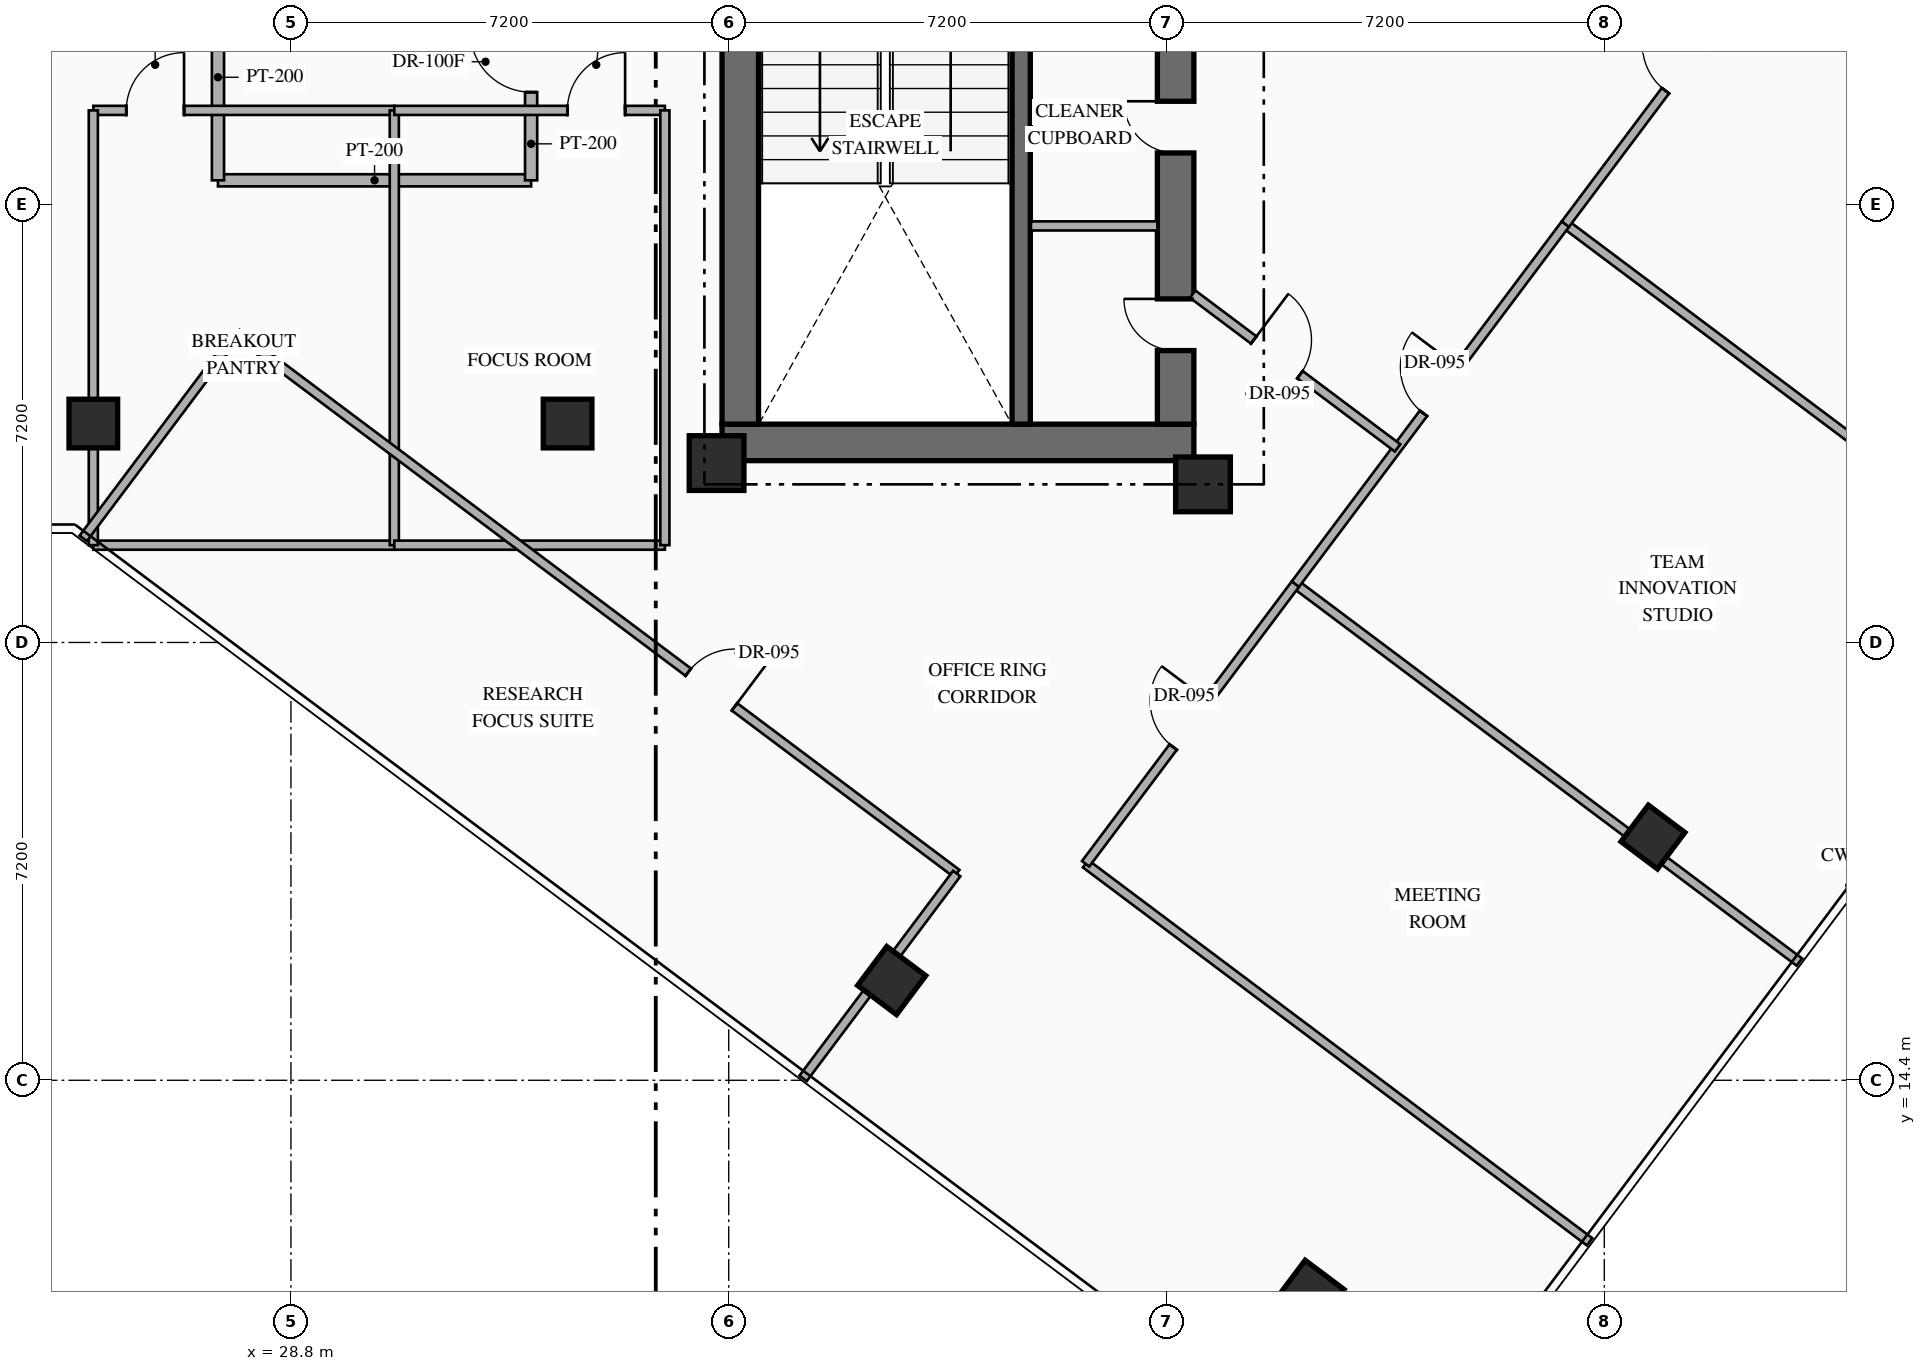
"""IFC4 building model, lengths in metres.
Left out: names, types, materials, properties, quantities, classifications, styles, units other than length and angle.
Written with IfcOpenShell. Run it as: python <this file> out.ifc"""

import sys

from ifc_helpers import new_model, si_unit, direction, frame, frame_2d, origin, origin_2d, place, context, subcontext, project, spatial, rectangle, hollow_rectangle, extrude, element, fill, save


model = new_model("IFC4")
c1 = context("Model", 3, precision=1e-05, world=origin(), true_north=direction((0.0, 1.0)))
c2 = subcontext(c1, "Body", "Model", "MODEL_VIEW")
j1 = project(units=[si_unit("LENGTHUNIT", "METRE"), si_unit("PLANEANGLEUNIT", "RADIAN")], contexts=[c1])
p1 = place(None, origin())
s1 = spatial("IfcSite", under=j1, at=p1, CompositionType="ELEMENT")
p2 = place(p1, origin())
s2 = spatial("IfcBuilding", under=s1, at=p2, CompositionType="ELEMENT")
p3 = place(p2, frame((0.0, 0.0, 178.05)))
s3 = spatial("IfcBuildingStorey", under=s2, at=p3, CompositionType="ELEMENT", Elevation=178.05)
p4 = place(p3, frame((35.89, 24.89, 0.0), z_axis=(0.0, 0.0, 1.0), x_axis=(1.0, 0.0, 0.0)))
e1 = element("IfcWall", 1, at=p4, inside=s3, PredefinedType="SHEAR", context=c2, shape_type="SweptSolid", body=[
    extrude(rectangle(XDim=7.76, YDim=0.6, at=frame_2d((3.88, 0.0))), origin(), (0.0, 0.0, 1.0), 3.6),
])
p5 = place(p3, frame((36.19, 25.19, 0.0), z_axis=(0.0, 0.0, 1.0), x_axis=(0.0, 1.0, 0.0)))
e2 = element("IfcWall", 2, at=p5, inside=s3, PredefinedType="SHEAR", context=c2, shape_type="SweptSolid", body=[
    extrude(rectangle(XDim=9.48, YDim=0.6, at=frame_2d((4.74, 0.0))), origin(), (0.0, 0.0, 1.0), 3.6),
])
p6 = place(p3, frame((43.35, 25.19, 0.0), z_axis=(0.0, 0.0, 1.0), x_axis=(0.0, 1.0, 0.0)))
e3 = element("IfcWall", 3, at=p6, inside=s3, PredefinedType="SHEAR", context=c2, shape_type="SweptSolid", body=[
    extrude(rectangle(XDim=9.48, YDim=0.6, at=frame_2d((4.74, 0.0))), origin(), (0.0, 0.0, 1.0), 3.6),
])
p7 = place(p6, frame((1.21, 0.0, 0.0)))
e4 = element("IfcOpeningElement", 4, at=p7, cuts=e3, PredefinedType="OPENING", context=c2, shape_type="SweptSolid", body=[
    extrude(rectangle(XDim=0.85, YDim=2.08, at=frame_2d((0.425, 1.04))), frame((0.0, 0.31, 0.0), z_axis=(0.0, -1.0, 0.0), x_axis=(1.0, 0.0, 0.0)), (0.0, 0.0, 1.0), 0.62),
])
p8 = place(p6, frame((4.46, 0.0, 0.0)))
e5 = element("IfcOpeningElement", 5, at=p8, cuts=e3, PredefinedType="OPENING", context=c2, shape_type="SweptSolid", body=[
    extrude(rectangle(XDim=0.85, YDim=2.08, at=frame_2d((0.425, 1.04))), frame((0.0, 0.31, 0.0), z_axis=(0.0, -1.0, 0.0), x_axis=(1.0, 0.0, 0.0)), (0.0, 0.0, 1.0), 0.62),
])
p9 = place(p3, frame((40.81, 25.19, 0.0), z_axis=(0.0, 0.0, 1.0), x_axis=(0.0, 1.0, 0.0)))
e6 = element("IfcWall", 6, at=p9, inside=s3, PredefinedType="SHEAR", context=c2, shape_type="SweptSolid", body=[
    extrude(rectangle(XDim=9.48, YDim=0.3, at=frame_2d((4.74, 0.0))), origin(), (0.0, 0.0, 1.0), 3.6),
])
for number, where, z_axis, x_axis in (
    (7, (35.8, 24.55, 0.0), (0.0, 0.0, 1.0), (1.0, 0.0, 0.0)),
    (8, (43.8, 24.2, 0.0), (0.0, 0.0, 1.0), (1.0, 0.0, 0.0)),
):
    element("IfcColumn", number, at=place(p3, frame(where, z_axis=z_axis, x_axis=x_axis)), inside=s3, PredefinedType="COLUMN", context=c2, shape_type="SweptSolid", body=[
        extrude(rectangle(XDim=0.9, YDim=0.9, at=origin_2d()), origin(), (0.0, 0.0, 1.0), 3.6),
    ])
for number, where, z_axis, x_axis in (
    (9, (25.55, 25.2, 0.0), (0.0, 0.0, 1.0), (1.0, 0.0, 0.0)),
    (10, (33.35, 25.2, 0.0), (0.0, 0.0, 1.0), (1.0, 0.0, 0.0)),
    (11, (38.68, 16.04, 0.0), (0.0, 0.0, 1.0), (0.8, -0.6, 0.0)),
    (12, (45.56, 10.88, 0.0), (0.0, 0.0, 1.0), (0.8, -0.6, 0.0)),
):
    element("IfcColumn", number, at=place(p3, frame(where, z_axis=z_axis, x_axis=x_axis)), inside=s3, PredefinedType="COLUMN", context=c2, shape_type="SweptSolid", body=[
        extrude(hollow_rectangle(XDim=0.8, YDim=0.8, WallThickness=0.032, at=origin_2d()), origin(), (0.0, 0.0, 1.0), 3.6),
    ])
p10 = place(p3, frame((51.2, 18.4, 0.0), z_axis=(0.0, 0.0, 1.0), x_axis=(0.799999996291, -0.600000004945, 0.0)))
e13 = element("IfcColumn", 13, at=p10, inside=s3, PredefinedType="COLUMN", context=c2, shape_type="SweptSolid", body=[
    extrude(hollow_rectangle(XDim=0.75, YDim=0.75, WallThickness=0.028, at=origin_2d()), origin(), (0.0, 0.0, 1.0), 3.6),
])
p11 = place(p3, frame((44.86, 40.73, 0.0), z_axis=(0.0, 0.0, 1.0), x_axis=(0.800007624502, -0.599989833863, 0.0)))
e14 = element("IfcWall", 14, at=p11, inside=s3, PredefinedType="STANDARD", context=c2, shape_type="SweptSolid", body=[
    extrude(rectangle(XDim=19.212, YDim=0.28, at=frame_2d((9.606, 0.0))), origin(), (0.0, 0.0, 1.0), 3.3),
])
p12 = place(p11, frame((1.755, 0.0, 0.0)))
e15 = element("IfcOpeningElement", 15, at=p12, cuts=e14, PredefinedType="OPENING", context=c2, shape_type="SweptSolid", body=[
    extrude(rectangle(XDim=1.1, YDim=2.2, at=frame_2d((0.55, 1.1))), frame((0.0, 0.15, 0.0), z_axis=(0.0, -1.0, 0.0), x_axis=(1.0, 0.0, 0.0)), (0.0, 0.0, 1.0), 0.3),
])
p13 = place(p11, frame((13.509, 0.0, 0.85)))
e16 = element("IfcOpeningElement", 16, at=p13, cuts=e14, PredefinedType="OPENING", context=c2, shape_type="SweptSolid", body=[
    extrude(rectangle(XDim=1.8, YDim=2.1, at=frame_2d((0.9, 1.05))), frame((0.0, 0.15, 0.0), z_axis=(0.0, -1.0, 0.0), x_axis=(1.0, 0.0, 0.0)), (0.0, 0.0, 1.0), 0.3),
])
p14 = place(p3, frame((40.97, 28.45, 0.0), z_axis=(0.0, 0.0, 1.0), x_axis=(1.0, 0.0, 0.0)))
e17 = element("IfcWall", 17, at=p14, inside=s3, PredefinedType="PARTITIONING", context=c2, shape_type="SweptSolid", body=[
    extrude(rectangle(XDim=2.08, YDim=0.15, at=frame_2d((1.04, 0.0))), origin(), (0.0, 0.0, 1.0), 3.3),
])
p15 = place(p3, frame((27.6, 29.2, 0.0), z_axis=(0.0, 0.0, 1.0), x_axis=(1.0, 0.0, 0.0)))
e18 = element("IfcWall", 18, at=p15, inside=s3, PredefinedType="STANDARD", context=c2, shape_type="SweptSolid", body=[
    extrude(rectangle(XDim=5.15, YDim=0.2, at=frame_2d((2.575, 0.0))), origin(), (0.0, 0.0, 1.0), 3.3),
])
p16 = place(p3, frame((27.6, 29.2, 0.0), z_axis=(0.0, 0.0, 1.0), x_axis=(0.0, 1.0, 0.0)))
e19 = element("IfcWall", 19, at=p16, inside=s3, PredefinedType="STANDARD", context=c2, shape_type="SweptSolid", body=[
    extrude(rectangle(XDim=3.39, YDim=0.2, at=frame_2d((1.695, 0.0))), origin(), (0.0, 0.0, 1.0), 3.3),
])
p17 = place(p3, frame((32.75, 29.2, 0.0), z_axis=(0.0, 0.0, 1.0), x_axis=(0.0, 1.0, 0.0)))
e20 = element("IfcWall", 20, at=p17, inside=s3, PredefinedType="STANDARD", context=c2, shape_type="SweptSolid", body=[
    extrude(rectangle(XDim=3.39, YDim=0.2, at=frame_2d((1.695, 0.0))), origin(), (0.0, 0.0, 1.0), 3.3),
])
p18 = place(p17, frame((1.45, 0.0, 0.0)))
e21 = element("IfcOpeningElement", 21, at=p18, cuts=e20, PredefinedType="OPENING", context=c2, shape_type="SweptSolid", body=[
    extrude(rectangle(XDim=1.0, YDim=2.2, at=frame_2d((0.5, 1.1))), frame((0.0, 0.11, 0.0), z_axis=(0.0, -1.0, 0.0), x_axis=(1.0, 0.0, 0.0)), (0.0, 0.0, 1.0), 0.22),
])
p19 = place(p3, frame((25.55, 23.2, 0.0), z_axis=(0.0, 0.0, 1.0), x_axis=(1.0, 0.0, 0.0)))
e22 = element("IfcWall", 22, at=p19, inside=s3, PredefinedType="PARTITIONING", context=c2, shape_type="SweptSolid", body=[
    extrude(rectangle(XDim=4.95, YDim=0.15, at=frame_2d((2.475, 0.0))), origin(), (0.0, 0.0, 1.0), 3.3),
])
p20 = place(p3, frame((25.55, 30.35, 0.0), z_axis=(0.0, 0.0, 1.0), x_axis=(1.0, 0.0, 0.0)))
e23 = element("IfcWall", 23, at=p20, inside=s3, PredefinedType="PARTITIONING", context=c2, shape_type="SweptSolid", body=[
    extrude(rectangle(XDim=4.95, YDim=0.15, at=frame_2d((2.475, 0.0))), origin(), (0.0, 0.0, 1.0), 3.3),
])
p21 = place(p20, frame((0.542, 0.0, 0.0)))
e24 = element("IfcOpeningElement", 24, at=p21, cuts=e23, PredefinedType="OPENING", context=c2, shape_type="SweptSolid", body=[
    extrude(rectangle(XDim=0.95, YDim=2.15, at=frame_2d((0.475, 1.075))), frame((0.0, 0.085, 0.0), z_axis=(0.0, -1.0, 0.0), x_axis=(1.0, 0.0, 0.0)), (0.0, 0.0, 1.0), 0.17),
])
p22 = place(p3, frame((25.55, 23.2, 0.0), z_axis=(0.0, 0.0, 1.0), x_axis=(0.0, 1.0, 0.0)))
e25 = element("IfcWall", 25, at=p22, inside=s3, PredefinedType="PARTITIONING", context=c2, shape_type="SweptSolid", body=[
    extrude(rectangle(XDim=7.15, YDim=0.15, at=frame_2d((3.575, 0.0))), origin(), (0.0, 0.0, 1.0), 2.645),
])
p23 = place(p3, frame((30.5, 23.2, 0.0), z_axis=(0.0, 0.0, 1.0), x_axis=(0.0, 1.0, 0.0)))
e26 = element("IfcWall", 26, at=p23, inside=s3, PredefinedType="PARTITIONING", context=c2, shape_type="SweptSolid", body=[
    extrude(rectangle(XDim=7.15, YDim=0.15, at=frame_2d((3.575, 0.0))), origin(), (0.0, 0.0, 1.0), 3.3),
])
p24 = place(p3, frame((30.5, 23.2, 0.0), z_axis=(0.0, 0.0, 1.0), x_axis=(1.0, 0.0, 0.0)))
e27 = element("IfcWall", 27, at=p24, inside=s3, PredefinedType="PARTITIONING", context=c2, shape_type="SweptSolid", body=[
    extrude(rectangle(XDim=4.45, YDim=0.15, at=frame_2d((2.225, 0.0))), origin(), (0.0, 0.0, 1.0), 3.3),
])
p25 = place(p3, frame((30.5, 30.35, 0.0), z_axis=(0.0, 0.0, 1.0), x_axis=(1.0, 0.0, 0.0)))
e28 = element("IfcWall", 28, at=p25, inside=s3, PredefinedType="PARTITIONING", context=c2, shape_type="SweptSolid", body=[
    extrude(rectangle(XDim=4.45, YDim=0.15, at=frame_2d((2.225, 0.0))), origin(), (0.0, 0.0, 1.0), 3.3),
])
p26 = place(p25, frame((2.846, 0.0, 0.0)))
e29 = element("IfcOpeningElement", 29, at=p26, cuts=e28, PredefinedType="OPENING", context=c2, shape_type="SweptSolid", body=[
    extrude(rectangle(XDim=0.95, YDim=2.15, at=frame_2d((0.475, 1.075))), frame((0.0, 0.085, 0.0), z_axis=(0.0, -1.0, 0.0), x_axis=(1.0, 0.0, 0.0)), (0.0, 0.0, 1.0), 0.17),
])
p27 = place(p3, frame((34.95, 23.2, 0.0), z_axis=(0.0, 0.0, 1.0), x_axis=(0.0, 1.0, 0.0)))
e30 = element("IfcWall", 30, at=p27, inside=s3, PredefinedType="PARTITIONING", context=c2, shape_type="SweptSolid", body=[
    extrude(rectangle(XDim=7.15, YDim=0.15, at=frame_2d((3.575, 0.0))), origin(), (0.0, 0.0, 1.0), 3.3),
])
p28 = place(p3, frame((41.87, 17.96, 0.0), z_axis=(0.0, 0.0, 1.0), x_axis=(0.799991516197, -0.600011311571, 0.0)))
e31 = element("IfcWall", 31, at=p28, inside=s3, PredefinedType="PARTITIONING", context=c2, shape_type="SweptSolid", body=[
    extrude(rectangle(XDim=10.36, YDim=0.15, at=frame_2d((5.18, 0.0))), origin(), (0.0, 0.0, 1.0), 3.3),
])
p29 = place(p3, frame((45.32, 22.56, 0.0), z_axis=(0.0, 0.0, 1.0), x_axis=(0.799991516197, -0.600011311571, 0.0)))
e32 = element("IfcWall", 32, at=p29, inside=s3, PredefinedType="PARTITIONING", context=c2, shape_type="SweptSolid", body=[
    extrude(rectangle(XDim=10.36, YDim=0.15, at=frame_2d((5.18, 0.0))), origin(), (0.0, 0.0, 1.0), 2.645),
])
p30 = place(p3, frame((41.87, 17.96, 0.0), z_axis=(0.0, 0.0, 1.0), x_axis=(0.599986413072, 0.800010190015, 0.0)))
e33 = element("IfcWall", 33, at=p30, inside=s3, PredefinedType="PARTITIONING", context=c2, shape_type="SweptSolid", body=[
    extrude(rectangle(XDim=5.75, YDim=0.15, at=frame_2d((2.875, 0.0))), origin(), (0.0, 0.0, 1.0), 3.3),
])
p31 = place(p30, frame((2.4, 0.0, 0.0)))
e34 = element("IfcOpeningElement", 34, at=p31, cuts=e33, PredefinedType="OPENING", context=c2, shape_type="SweptSolid", body=[
    extrude(rectangle(XDim=0.95, YDim=2.15, at=frame_2d((0.475, 1.075))), frame((0.0, 0.085, 0.0), z_axis=(0.0, -1.0, 0.0), x_axis=(1.0, 0.0, 0.0)), (0.0, 0.0, 1.0), 0.17),
])
p32 = place(p3, frame((49.76, 28.48, 0.0), z_axis=(0.0, 0.0, 1.0), x_axis=(0.8, -0.6, 0.0)))
e35 = element("IfcWall", 35, at=p32, inside=s3, PredefinedType="PARTITIONING", context=c2, shape_type="SweptSolid", body=[
    extrude(rectangle(XDim=10.36, YDim=0.15, at=frame_2d((5.18, 0.0))), origin(), (0.0, 0.0, 1.0), 3.3),
])
p33 = place(p3, frame((45.32, 22.56, 0.0), z_axis=(0.0, 0.0, 1.0), x_axis=(0.6, 0.8, 0.0)))
e36 = element("IfcWall", 36, at=p33, inside=s3, PredefinedType="PARTITIONING", context=c2, shape_type="SweptSolid", body=[
    extrude(rectangle(XDim=7.4, YDim=0.15, at=frame_2d((3.7, 0.0))), origin(), (0.0, 0.0, 1.0), 3.3),
])
p34 = place(p33, frame((3.51, 0.0, 0.0)))
e37 = element("IfcOpeningElement", 37, at=p34, cuts=e36, PredefinedType="OPENING", context=c2, shape_type="SweptSolid", body=[
    extrude(rectangle(XDim=0.95, YDim=2.15, at=frame_2d((0.475, 1.075))), frame((0.0, 0.085, 0.0), z_axis=(0.0, -1.0, 0.0), x_axis=(1.0, 0.0, 0.0)), (0.0, 0.0, 1.0), 0.17),
])
p35 = place(p3, frame((49.76, 28.48, 0.0), z_axis=(0.0, 0.0, 1.0), x_axis=(0.599994387644, 0.800004209236, 0.0)))
e38 = element("IfcWall", 38, at=p35, inside=s3, PredefinedType="PARTITIONING", context=c2, shape_type="SweptSolid", body=[
    extrude(rectangle(XDim=6.96, YDim=0.15, at=frame_2d((3.48, 0.0))), origin(), (0.0, 0.0, 1.0), 3.3),
])
p36 = place(p35, frame((2.743, 0.0, 0.0)))
e39 = element("IfcOpeningElement", 39, at=p36, cuts=e38, PredefinedType="OPENING", context=c2, shape_type="SweptSolid", body=[
    extrude(rectangle(XDim=0.95, YDim=2.15, at=frame_2d((0.475, 1.075))), frame((0.0, 0.085, 0.0), z_axis=(0.0, -1.0, 0.0), x_axis=(1.0, 0.0, 0.0)), (0.0, 0.0, 1.0), 0.17),
])
p37 = place(p3, frame((43.63, 27.328, 0.0), z_axis=(0.0, 0.0, 1.0), x_axis=(0.799972182084, -0.600037088764, 0.0)))
e40 = element("IfcWall", 40, at=p37, inside=s3, PredefinedType="PARTITIONING", context=c2, shape_type="SweptSolid", body=[
    extrude(rectangle(XDim=4.213, YDim=0.15, at=frame_2d((2.106, 0.0))), origin(), (0.0, 0.0, 1.0), 2.995),
])
p38 = place(p37, frame((1.256, 0.0, 0.0)))
e41 = element("IfcOpeningElement", 41, at=p38, cuts=e40, PredefinedType="OPENING", context=c2, shape_type="SweptSolid", body=[
    extrude(rectangle(XDim=0.95, YDim=2.15, at=frame_2d((0.475, 1.075))), frame((0.0, 0.085, 0.0), z_axis=(0.0, -1.0, 0.0), x_axis=(1.0, 0.0, 0.0)), (0.0, 0.0, 1.0), 0.17),
])
p39 = place(p3, frame((27.91, 26.68, 0.0), z_axis=(0.0, 0.0, 1.0), x_axis=(0.800005938517, -0.599992081896, 0.0)))
e42 = element("IfcWall", 42, at=p39, inside=s3, PredefinedType="PARTITIONING", context=c2, shape_type="SweptSolid", body=[
    extrude(rectangle(XDim=14.8, YDim=0.15, at=frame_2d((7.4, 0.0))), origin(), (0.0, 0.0, 1.0), 3.3),
])
p40 = place(p39, frame((9.281, 0.0, 0.0)))
e43 = element("IfcOpeningElement", 43, at=p40, cuts=e42, PredefinedType="OPENING", context=c2, shape_type="SweptSolid", body=[
    extrude(rectangle(XDim=0.95, YDim=2.15, at=frame_2d((0.475, 1.075))), frame((0.0, 0.085, 0.0), z_axis=(0.0, -1.0, 0.0), x_axis=(1.0, 0.0, 0.0)), (0.0, 0.0, 1.0), 0.17),
])
p41 = place(p3, frame((25.384, 23.312, 0.0), z_axis=(0.0, 0.0, 1.0), x_axis=(0.599990721155, 0.80000695905, 0.0)))
e44 = element("IfcWall", 44, at=p41, inside=s3, PredefinedType="PARTITIONING", context=c2, shape_type="SweptSolid", body=[
    extrude(rectangle(XDim=4.21, YDim=0.15, at=frame_2d((2.105, 0.0))), origin(), (0.0, 0.0, 1.0), 3.3),
])
p42 = place(p3, frame((37.224, 14.432, 0.0), z_axis=(0.0, 0.0, 1.0), x_axis=(0.599962885857, 0.800027834262, 0.0)))
e45 = element("IfcWall", 45, at=p42, inside=s3, PredefinedType="PARTITIONING", context=c2, shape_type="SweptSolid", body=[
    extrude(rectangle(XDim=4.21, YDim=0.15, at=frame_2d((2.105, 0.0))), origin(), (0.0, 0.0, 1.0), 2.645),
])
p43 = place(p7, origin())
e46 = element("IfcDoor", 46, at=p43, inside=s3, OperationType="SINGLE_SWING_RIGHT", PredefinedType="DOOR", context=c2, shape_type="SweptSolid", body=[
    extrude(rectangle(XDim=0.85, YDim=2.08, at=frame_2d((0.425, 1.04))), frame((0.0, 0.025, 0.0), z_axis=(0.0, -1.0, 0.0), x_axis=(1.0, 0.0, 0.0)), (0.0, 0.0, 1.0), 0.05),
])
fill(e4, e46)
p44 = place(p8, origin())
e47 = element("IfcDoor", 47, at=p44, inside=s3, OperationType="SINGLE_SWING_RIGHT", PredefinedType="DOOR", context=c2, shape_type="SweptSolid", body=[
    extrude(rectangle(XDim=0.85, YDim=2.08, at=frame_2d((0.425, 1.04))), frame((0.0, 0.025, 0.0), z_axis=(0.0, -1.0, 0.0), x_axis=(1.0, 0.0, 0.0)), (0.0, 0.0, 1.0), 0.05),
])
fill(e5, e47)
p45 = place(p18, origin())
e48 = element("IfcDoor", 48, at=p45, inside=s3, OperationType="SINGLE_SWING_RIGHT", PredefinedType="DOOR", context=c2, shape_type="SweptSolid", body=[
    extrude(rectangle(XDim=1.0, YDim=2.2, at=frame_2d((0.5, 1.1))), frame((0.0, 0.025, 0.0), z_axis=(0.0, -1.0, 0.0), x_axis=(1.0, 0.0, 0.0)), (0.0, 0.0, 1.0), 0.05),
])
fill(e21, e48)
p46 = place(p21, origin())
e49 = element("IfcDoor", 49, at=p46, inside=s3, OperationType="SINGLE_SWING_RIGHT", PredefinedType="DOOR", context=c2, shape_type="SweptSolid", body=[
    extrude(rectangle(XDim=0.95, YDim=2.15, at=frame_2d((0.475, 1.075))), frame((0.0, 0.025, 0.0), z_axis=(0.0, -1.0, 0.0), x_axis=(1.0, 0.0, 0.0)), (0.0, 0.0, 1.0), 0.05),
])
fill(e24, e49)
p47 = place(p26, origin())
e50 = element("IfcDoor", 50, at=p47, inside=s3, OperationType="SINGLE_SWING_RIGHT", PredefinedType="DOOR", context=c2, shape_type="SweptSolid", body=[
    extrude(rectangle(XDim=0.95, YDim=2.15, at=frame_2d((0.475, 1.075))), frame((0.0, 0.025, 0.0), z_axis=(0.0, -1.0, 0.0), x_axis=(1.0, 0.0, 0.0)), (0.0, 0.0, 1.0), 0.05),
])
fill(e29, e50)
p48 = place(p31, origin())
e51 = element("IfcDoor", 51, at=p48, inside=s3, OperationType="SINGLE_SWING_RIGHT", PredefinedType="DOOR", context=c2, shape_type="SweptSolid", body=[
    extrude(rectangle(XDim=0.95, YDim=2.15, at=frame_2d((0.475, 1.075))), frame((0.0, 0.025, 0.0), z_axis=(0.0, -1.0, 0.0), x_axis=(1.0, 0.0, 0.0)), (0.0, 0.0, 1.0), 0.05),
])
fill(e34, e51)
p49 = place(p34, origin())
e52 = element("IfcDoor", 52, at=p49, inside=s3, OperationType="SINGLE_SWING_RIGHT", PredefinedType="DOOR", context=c2, shape_type="SweptSolid", body=[
    extrude(rectangle(XDim=0.95, YDim=2.15, at=frame_2d((0.475, 1.075))), frame((0.0, 0.025, 0.0), z_axis=(0.0, -1.0, 0.0), x_axis=(1.0, 0.0, 0.0)), (0.0, 0.0, 1.0), 0.05),
])
fill(e37, e52)
p50 = place(p36, origin())
e53 = element("IfcDoor", 53, at=p50, inside=s3, OperationType="SINGLE_SWING_RIGHT", PredefinedType="DOOR", context=c2, shape_type="SweptSolid", body=[
    extrude(rectangle(XDim=0.95, YDim=2.15, at=frame_2d((0.475, 1.075))), frame((0.0, 0.025, 0.0), z_axis=(0.0, -1.0, 0.0), x_axis=(1.0, 0.0, 0.0)), (0.0, 0.0, 1.0), 0.05),
])
fill(e39, e53)
p51 = place(p38, origin())
e54 = element("IfcDoor", 54, at=p51, inside=s3, OperationType="SINGLE_SWING_LEFT", PredefinedType="DOOR", context=c2, shape_type="SweptSolid", body=[
    extrude(rectangle(XDim=0.95, YDim=2.15, at=frame_2d((0.475, 1.075))), frame((0.0, 0.025, 0.0), z_axis=(0.0, -1.0, 0.0), x_axis=(1.0, 0.0, 0.0)), (0.0, 0.0, 1.0), 0.05),
])
fill(e41, e54)
p52 = place(p40, origin())
e55 = element("IfcDoor", 55, at=p52, inside=s3, OperationType="SINGLE_SWING_RIGHT", PredefinedType="DOOR", context=c2, shape_type="SweptSolid", body=[
    extrude(rectangle(XDim=0.95, YDim=2.15, at=frame_2d((0.475, 1.075))), frame((0.0, 0.025, 0.0), z_axis=(0.0, -1.0, 0.0), x_axis=(1.0, 0.0, 0.0)), (0.0, 0.0, 1.0), 0.05),
])
fill(e43, e55)
save(model, sys.argv[1])
